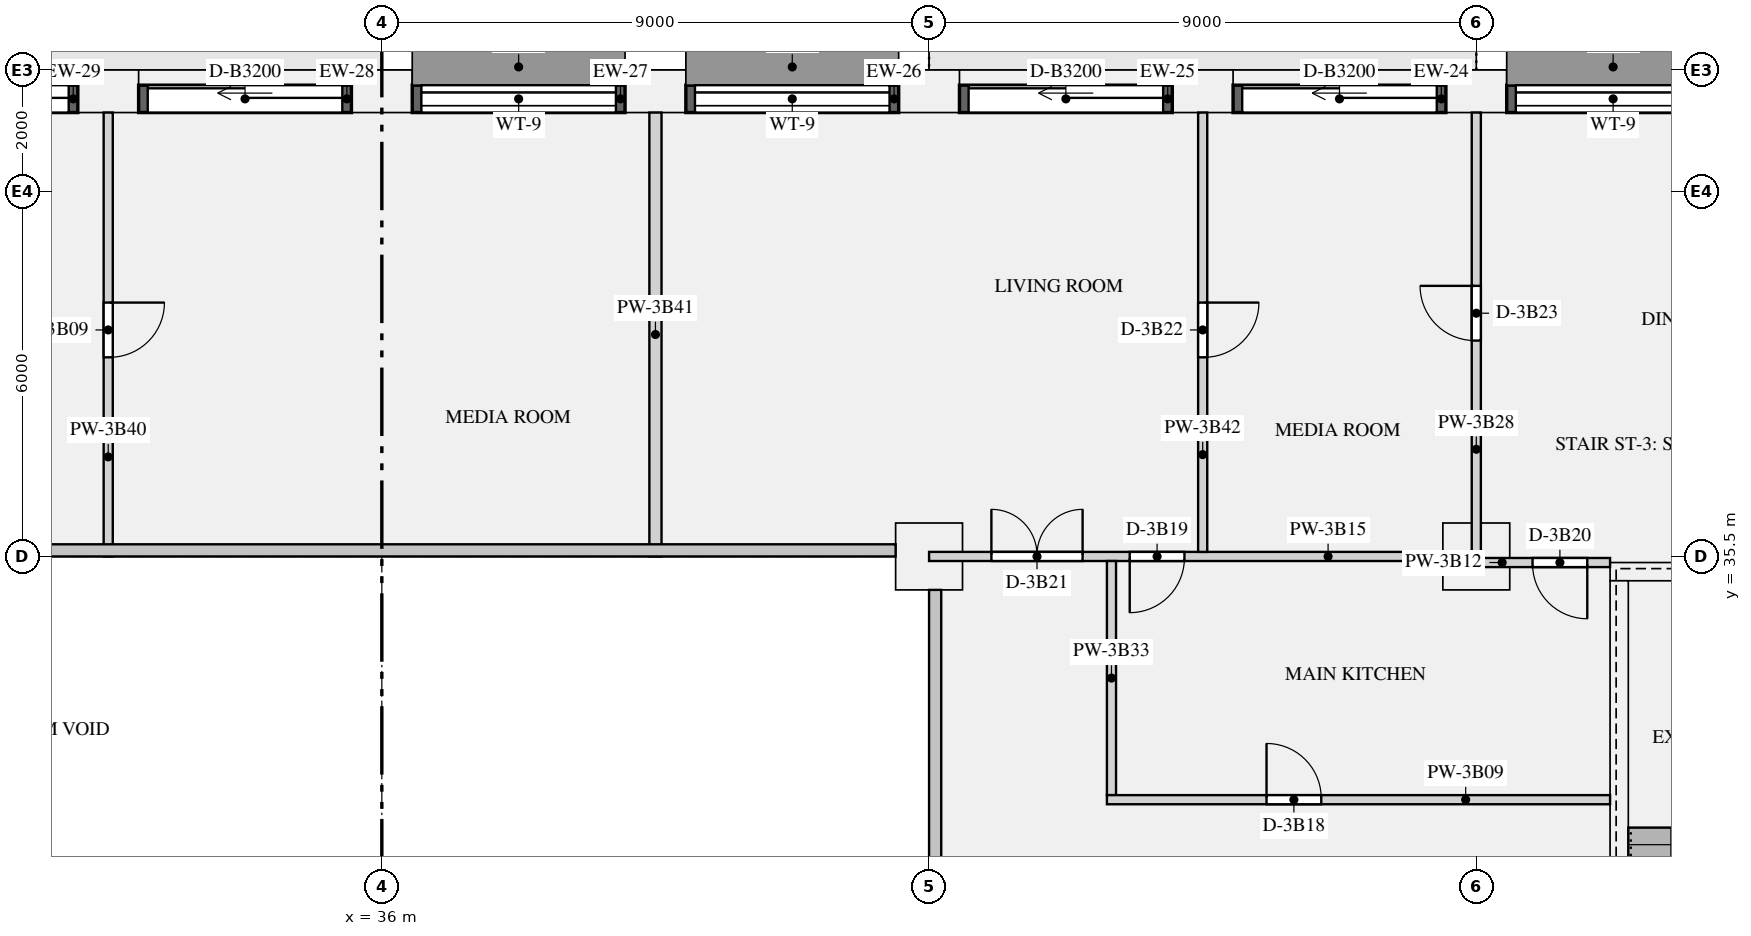
"""IFC4 building model, lengths in metres.
Left out: names, types, materials, properties, quantities, classifications, styles, units other than length and angle.
Written with IfcOpenShell. Run it as: python <this file> out.ifc"""

import sys

from ifc_helpers import new_model, si_unit, direction, frame, frame_2d, origin, origin_2d, place, context, subcontext, project, spatial, rectangle, extrude, element, fill, save


model = new_model("IFC4")
c1 = context("Model", 3, precision=1e-05, world=origin(), true_north=direction((0.0, 1.0)))
c2 = subcontext(c1, "Body", "Model", "MODEL_VIEW")
j1 = project(units=[si_unit("LENGTHUNIT", "METRE"), si_unit("PLANEANGLEUNIT", "RADIAN")], contexts=[c1])
p1 = place(None, origin())
s1 = spatial("IfcSite", under=j1, at=p1, CompositionType="ELEMENT")
p2 = place(p1, origin())
s2 = spatial("IfcBuilding", under=s1, at=p2, CompositionType="ELEMENT")
p3 = place(p2, frame((0.0, 0.0, 150.75)))
s3 = spatial("IfcBuildingStorey", under=s2, at=p3, CompositionType="ELEMENT", Elevation=150.75)
for number, where, z_axis, x_axis in (
    (1, (54.0, 43.15, 0.0), (0.0, 0.0, 1.0), (-1.0, 0.0, 0.0)),
    (2, (49.5, 43.15, 0.0), (0.0, 0.0, 1.0), (-1.0, 0.0, 0.0)),
    (3, (45.0, 43.15, 0.0), (0.0, 0.0, 1.0), (-1.0, 0.0, 0.0)),
    (4, (40.5, 43.15, 0.0), (0.0, 0.0, 1.0), (-1.0, 0.0, 0.0)),
    (5, (36.0, 43.15, 0.0), (0.0, 0.0, 1.0), (-1.0, 0.0, 0.0)),
    (6, (31.5, 43.15, 0.0), (0.0, 0.0, 1.0), (-1.0, 0.0, 0.0)),
):
    element("IfcColumn", number, at=place(p3, frame(where, z_axis=z_axis, x_axis=x_axis)), inside=s3, PredefinedType="USERDEFINED", context=c2, shape_type="SweptSolid", body=[
        extrude(rectangle(XDim=1.0, YDim=0.7, at=origin_2d()), origin(), (0.0, 0.0, 1.0), 3.15),
    ])
for number, where, z_axis, x_axis in (
    (7, (45.0, 35.5, 0.0), (0.0, 0.0, 1.0), (1.0, 0.0, 0.0)),
    (8, (54.0, 35.5, 0.0), (0.0, 0.0, 1.0), (1.0, 0.0, 0.0)),
):
    element("IfcColumn", number, at=place(p3, frame(where, z_axis=z_axis, x_axis=x_axis)), inside=s3, PredefinedType="COLUMN", context=c2, shape_type="SweptSolid", body=[
        extrude(rectangle(XDim=1.1, YDim=1.1, at=origin_2d()), origin(), (0.0, 0.0, 1.0), 3.15),
    ])
p4 = place(p3, frame((56.2, 35.25, 0.0), z_axis=(0.0, 0.0, 1.0), x_axis=(1.0, 0.0, 0.0)))
e9 = element("IfcWall", 9, at=p4, inside=s3, PredefinedType="SHEAR", context=c2, shape_type="SweptSolid", body=[
    extrude(rectangle(XDim=3.6, YDim=0.3, at=frame_2d((1.8, 0.0))), origin(), (0.0, 0.0, 1.0), 3.15),
])
p5 = place(p3, frame((56.35, 27.3, 0.0), z_axis=(0.0, 0.0, 1.0), x_axis=(0.0, 1.0, 0.0)))
e10 = element("IfcWall", 10, at=p5, inside=s3, PredefinedType="SHEAR", context=c2, shape_type="SweptSolid", body=[
    extrude(rectangle(XDim=7.8, YDim=0.3, at=frame_2d((3.9, 0.0))), origin(), (0.0, 0.0, 1.0), 3.15),
])
p6 = place(p3, frame((58.0, 43.025, 0.9), z_axis=(0.0, 0.0, 1.0), x_axis=(-1.0, 0.0, 0.0)))
e11 = element("IfcWall", 11, at=p6, inside=s3, PredefinedType="SOLIDWALL", context=c2, shape_type="SweptSolid", body=[
    extrude(rectangle(XDim=3.5, YDim=0.45, at=frame_2d((1.75, 0.0))), origin(), (0.0, 0.0, 1.0), 1.93),
])
p7 = place(p6, frame((0.15, 0.0, 0.15)))
e12 = element("IfcOpeningElement", 12, at=p7, cuts=e11, PredefinedType="OPENING", context=c2, shape_type="SweptSolid", body=[
    extrude(rectangle(XDim=3.2, YDim=1.5, at=frame_2d((1.6, 0.75))), frame((0.0, 0.235, 0.0), z_axis=(0.0, -1.0, 0.0), x_axis=(1.0, 0.0, 0.0)), (0.0, 0.0, 1.0), 0.47),
])
p8 = place(p3, frame((53.5, 43.025, 0.0), z_axis=(0.0, 0.0, 1.0), x_axis=(-1.0, 0.0, 0.0)))
e13 = element("IfcWall", 13, at=p8, inside=s3, PredefinedType="SOLIDWALL", context=c2, shape_type="SweptSolid", body=[
    extrude(rectangle(XDim=3.5, YDim=0.45, at=frame_2d((1.75, 0.0))), origin(), (0.0, 0.0, 1.0), 2.83),
])
p9 = place(p8, frame((0.15, 0.0, 0.0)))
e14 = element("IfcOpeningElement", 14, at=p9, cuts=e13, PredefinedType="OPENING", context=c2, shape_type="SweptSolid", body=[
    extrude(rectangle(XDim=3.2, YDim=2.3, at=frame_2d((1.6, 1.15))), frame((0.0, 0.235, 0.0), z_axis=(0.0, -1.0, 0.0), x_axis=(1.0, 0.0, 0.0)), (0.0, 0.0, 1.0), 0.47),
])
p10 = place(p3, frame((49.0, 43.025, 0.0), z_axis=(0.0, 0.0, 1.0), x_axis=(-1.0, 0.0, 0.0)))
e15 = element("IfcWall", 15, at=p10, inside=s3, PredefinedType="SOLIDWALL", context=c2, shape_type="SweptSolid", body=[
    extrude(rectangle(XDim=3.5, YDim=0.45, at=frame_2d((1.75, 0.0))), origin(), (0.0, 0.0, 1.0), 2.83),
])
p11 = place(p10, frame((0.15, 0.0, 0.0)))
e16 = element("IfcOpeningElement", 16, at=p11, cuts=e15, PredefinedType="OPENING", context=c2, shape_type="SweptSolid", body=[
    extrude(rectangle(XDim=3.2, YDim=2.3, at=frame_2d((1.6, 1.15))), frame((0.0, 0.235, 0.0), z_axis=(0.0, -1.0, 0.0), x_axis=(1.0, 0.0, 0.0)), (0.0, 0.0, 1.0), 0.47),
])
p12 = place(p3, frame((44.5, 43.025, 0.9), z_axis=(0.0, 0.0, 1.0), x_axis=(-1.0, 0.0, 0.0)))
e17 = element("IfcWall", 17, at=p12, inside=s3, PredefinedType="SOLIDWALL", context=c2, shape_type="SweptSolid", body=[
    extrude(rectangle(XDim=3.5, YDim=0.45, at=frame_2d((1.75, 0.0))), origin(), (0.0, 0.0, 1.0), 1.93),
])
p13 = place(p12, frame((0.15, 0.0, 0.15)))
e18 = element("IfcOpeningElement", 18, at=p13, cuts=e17, PredefinedType="OPENING", context=c2, shape_type="SweptSolid", body=[
    extrude(rectangle(XDim=3.2, YDim=1.5, at=frame_2d((1.6, 0.75))), frame((0.0, 0.235, 0.0), z_axis=(0.0, -1.0, 0.0), x_axis=(1.0, 0.0, 0.0)), (0.0, 0.0, 1.0), 0.47),
])
p14 = place(p3, frame((40.0, 43.025, 0.9), z_axis=(0.0, 0.0, 1.0), x_axis=(-1.0, 0.0, 0.0)))
e19 = element("IfcWall", 19, at=p14, inside=s3, PredefinedType="SOLIDWALL", context=c2, shape_type="SweptSolid", body=[
    extrude(rectangle(XDim=3.5, YDim=0.45, at=frame_2d((1.75, 0.0))), origin(), (0.0, 0.0, 1.0), 1.93),
])
p15 = place(p14, frame((0.15, 0.0, 0.15)))
e20 = element("IfcOpeningElement", 20, at=p15, cuts=e19, PredefinedType="OPENING", context=c2, shape_type="SweptSolid", body=[
    extrude(rectangle(XDim=3.2, YDim=1.5, at=frame_2d((1.6, 0.75))), frame((0.0, 0.235, 0.0), z_axis=(0.0, -1.0, 0.0), x_axis=(1.0, 0.0, 0.0)), (0.0, 0.0, 1.0), 0.47),
])
p16 = place(p3, frame((35.5, 43.025, 0.0), z_axis=(0.0, 0.0, 1.0), x_axis=(-1.0, 0.0, 0.0)))
e21 = element("IfcWall", 21, at=p16, inside=s3, PredefinedType="SOLIDWALL", context=c2, shape_type="SweptSolid", body=[
    extrude(rectangle(XDim=3.5, YDim=0.45, at=frame_2d((1.75, 0.0))), origin(), (0.0, 0.0, 1.0), 2.83),
])
p17 = place(p16, frame((0.15, 0.0, 0.0)))
e22 = element("IfcOpeningElement", 22, at=p17, cuts=e21, PredefinedType="OPENING", context=c2, shape_type="SweptSolid", body=[
    extrude(rectangle(XDim=3.2, YDim=2.3, at=frame_2d((1.6, 1.15))), frame((0.0, 0.235, 0.0), z_axis=(0.0, -1.0, 0.0), x_axis=(1.0, 0.0, 0.0)), (0.0, 0.0, 1.0), 0.47),
])
p18 = place(p3, frame((31.0, 43.025, 0.0), z_axis=(0.0, 0.0, 1.0), x_axis=(-1.0, 0.0, 0.0)))
e23 = element("IfcWall", 23, at=p18, inside=s3, PredefinedType="SOLIDWALL", context=c2, shape_type="SweptSolid", body=[
    extrude(rectangle(XDim=3.5, YDim=0.45, at=frame_2d((1.75, 0.0))), origin(), (0.0, 0.0, 1.0), 2.83),
])
p19 = place(p18, frame((0.15, 0.0, 0.0)))
e24 = element("IfcOpeningElement", 24, at=p19, cuts=e23, PredefinedType="OPENING", context=c2, shape_type="SweptSolid", body=[
    extrude(rectangle(XDim=3.2, YDim=2.3, at=frame_2d((1.6, 1.15))), frame((0.0, 0.235, 0.0), z_axis=(0.0, -1.0, 0.0), x_axis=(1.0, 0.0, 0.0)), (0.0, 0.0, 1.0), 0.47),
])
p20 = place(p3, frame((47.925, 31.5, 0.0), z_axis=(0.0, 0.0, 1.0), x_axis=(1.0, 0.0, 0.0)))
e25 = element("IfcWall", 25, at=p20, inside=s3, PredefinedType="PARTITIONING", context=c2, shape_type="SweptSolid", body=[
    extrude(rectangle(XDim=8.275, YDim=0.15, at=frame_2d((4.137, 0.0))), origin(), (0.0, 0.0, 1.0), 2.83),
])
p21 = place(p20, frame((2.625, 0.0, 0.0)))
e26 = element("IfcOpeningElement", 26, at=p21, cuts=e25, PredefinedType="OPENING", context=c2, shape_type="SweptSolid", body=[
    extrude(rectangle(XDim=0.9, YDim=2.1, at=frame_2d((0.45, 1.05))), frame((0.0, 0.085, 0.0), z_axis=(0.0, -1.0, 0.0), x_axis=(1.0, 0.0, 0.0)), (0.0, 0.0, 1.0), 0.17),
])
p22 = place(p3, frame((53.925, 35.4, 0.0), z_axis=(0.0, 0.0, 1.0), x_axis=(1.0, 0.0, 0.0)))
e27 = element("IfcWall", 27, at=p22, inside=s3, PredefinedType="PARTITIONING", context=c2, shape_type="SweptSolid", body=[
    extrude(rectangle(XDim=2.275, YDim=0.15, at=frame_2d((1.137, 0.0))), origin(), (0.0, 0.0, 1.0), 2.83),
])
p23 = place(p22, frame((1.0, 0.0, 0.0)))
e28 = element("IfcOpeningElement", 28, at=p23, cuts=e27, PredefinedType="OPENING", context=c2, shape_type="SweptSolid", body=[
    extrude(rectangle(XDim=0.9, YDim=2.1, at=frame_2d((0.45, 1.05))), frame((0.0, 0.085, 0.0), z_axis=(0.0, -1.0, 0.0), x_axis=(1.0, 0.0, 0.0)), (0.0, 0.0, 1.0), 0.17),
])
p24 = place(p3, frame((45.0, 35.5, 0.0), z_axis=(0.0, 0.0, 1.0), x_axis=(1.0, 0.0, 0.0)))
e29 = element("IfcWall", 29, at=p24, inside=s3, PredefinedType="PARTITIONING", context=c2, shape_type="SweptSolid", body=[
    extrude(rectangle(XDim=8.925, YDim=0.15, at=frame_2d((4.462, 0.0))), origin(), (0.0, 0.0, 1.0), 2.83),
])
p25 = place(p24, frame((3.3, 0.0, 0.0)))
e30 = element("IfcOpeningElement", 30, at=p25, cuts=e29, PredefinedType="OPENING", context=c2, shape_type="SweptSolid", body=[
    extrude(rectangle(XDim=0.9, YDim=2.1, at=frame_2d((0.45, 1.05))), frame((0.0, 0.085, 0.0), z_axis=(0.0, -1.0, 0.0), x_axis=(1.0, 0.0, 0.0)), (0.0, 0.0, 1.0), 0.17),
])
p26 = place(p24, frame((1.025, 0.0, 0.0)))
e31 = element("IfcOpeningElement", 31, at=p26, cuts=e29, PredefinedType="OPENING", context=c2, shape_type="SweptSolid", body=[
    extrude(rectangle(XDim=1.5, YDim=2.1, at=frame_2d((0.75, 1.05))), frame((0.0, 0.085, 0.0), z_axis=(0.0, -1.0, 0.0), x_axis=(1.0, 0.0, 0.0)), (0.0, 0.0, 1.0), 0.17),
])
p27 = place(p3, frame((54.0, 35.475, 0.0), z_axis=(0.0, 0.0, 1.0), x_axis=(0.0, 1.0, 0.0)))
e32 = element("IfcWall", 32, at=p27, inside=s3, PredefinedType="PARTITIONING", context=c2, shape_type="SweptSolid", body=[
    extrude(rectangle(XDim=7.325, YDim=0.15, at=frame_2d((3.663, 0.0))), origin(), (0.0, 0.0, 1.0), 2.83),
])
p28 = place(p27, frame((3.575, 0.0, 0.0)))
e33 = element("IfcOpeningElement", 33, at=p28, cuts=e32, PredefinedType="OPENING", context=c2, shape_type="SweptSolid", body=[
    extrude(rectangle(XDim=0.9, YDim=2.1, at=frame_2d((0.45, 1.05))), frame((0.0, 0.085, 0.0), z_axis=(0.0, -1.0, 0.0), x_axis=(1.0, 0.0, 0.0)), (0.0, 0.0, 1.0), 0.17),
])
p29 = place(p3, frame((48.0, 31.575, 0.0), z_axis=(0.0, 0.0, 1.0), x_axis=(0.0, 1.0, 0.0)))
e34 = element("IfcWall", 34, at=p29, inside=s3, PredefinedType="PARTITIONING", context=c2, shape_type="SweptSolid", body=[
    extrude(rectangle(XDim=3.85, YDim=0.15, at=frame_2d((1.925, 0.0))), origin(), (0.0, 0.0, 1.0), 2.83),
])
p30 = place(p3, frame((31.5, 35.5, 0.0), z_axis=(0.0, 0.0, 1.0), x_axis=(0.0, 1.0, 0.0)))
e35 = element("IfcWall", 35, at=p30, inside=s3, PredefinedType="PARTITIONING", context=c2, shape_type="SweptSolid", body=[
    extrude(rectangle(XDim=7.3, YDim=0.15, at=frame_2d((3.65, 0.0))), origin(), (0.0, 0.0, 1.0), 2.83),
])
p31 = place(p30, frame((3.275, 0.0, 0.0)))
e36 = element("IfcOpeningElement", 36, at=p31, cuts=e35, PredefinedType="OPENING", context=c2, shape_type="SweptSolid", body=[
    extrude(rectangle(XDim=0.9, YDim=2.1, at=frame_2d((0.45, 1.05))), frame((0.0, 0.085, 0.0), z_axis=(0.0, -1.0, 0.0), x_axis=(1.0, 0.0, 0.0)), (0.0, 0.0, 1.0), 0.17),
])
p32 = place(p3, frame((40.5, 35.5, 0.0), z_axis=(0.0, 0.0, 1.0), x_axis=(0.0, 1.0, 0.0)))
e37 = element("IfcWall", 37, at=p32, inside=s3, PredefinedType="PARTITIONING", context=c2, shape_type="SweptSolid", body=[
    extrude(rectangle(XDim=7.3, YDim=0.2, at=frame_2d((3.65, 0.0))), origin(), (0.0, 0.0, 1.0), 2.83),
])
p33 = place(p3, frame((49.5, 35.575, 0.0), z_axis=(0.0, 0.0, 1.0), x_axis=(0.0, 1.0, 0.0)))
e38 = element("IfcWall", 38, at=p33, inside=s3, PredefinedType="PARTITIONING", context=c2, shape_type="SweptSolid", body=[
    extrude(rectangle(XDim=7.225, YDim=0.15, at=frame_2d((3.613, 0.0))), origin(), (0.0, 0.0, 1.0), 2.83),
])
p34 = place(p33, frame((3.2, 0.0, 0.0)))
e39 = element("IfcOpeningElement", 39, at=p34, cuts=e38, PredefinedType="OPENING", context=c2, shape_type="SweptSolid", body=[
    extrude(rectangle(XDim=0.9, YDim=2.1, at=frame_2d((0.45, 1.05))), frame((0.0, 0.085, 0.0), z_axis=(0.0, -1.0, 0.0), x_axis=(1.0, 0.0, 0.0)), (0.0, 0.0, 1.0), 0.17),
])
p35 = place(p7, origin())
e40 = element("IfcWindow", 40, at=p35, inside=s3, PartitioningType="SINGLE_PANEL", PredefinedType="WINDOW", context=c2, shape_type="SweptSolid", body=[
    extrude(rectangle(XDim=3.2, YDim=1.5, at=frame_2d((1.6, 0.75))), frame((0.0, -0.065, 0.0), z_axis=(0.0, -1.0, 0.0), x_axis=(1.0, 0.0, 0.0)), (0.0, 0.0, 1.0), 0.06),
])
fill(e12, e40)
p36 = place(p9, origin())
e41 = element("IfcDoor", 41, at=p36, inside=s3, OperationType="SLIDING_TO_LEFT", PredefinedType="DOOR", context=c2, shape_type="SweptSolid", body=[
    extrude(rectangle(XDim=3.2, YDim=2.3, at=frame_2d((1.6, 1.15))), frame((0.0, -0.07, 0.0), z_axis=(0.0, -1.0, 0.0), x_axis=(1.0, 0.0, 0.0)), (0.0, 0.0, 1.0), 0.05),
])
fill(e14, e41)
p37 = place(p11, origin())
e42 = element("IfcDoor", 42, at=p37, inside=s3, OperationType="SLIDING_TO_LEFT", PredefinedType="DOOR", context=c2, shape_type="SweptSolid", body=[
    extrude(rectangle(XDim=3.2, YDim=2.3, at=frame_2d((1.6, 1.15))), frame((0.0, -0.07, 0.0), z_axis=(0.0, -1.0, 0.0), x_axis=(1.0, 0.0, 0.0)), (0.0, 0.0, 1.0), 0.05),
])
fill(e16, e42)
p38 = place(p13, origin())
e43 = element("IfcWindow", 43, at=p38, inside=s3, PartitioningType="SINGLE_PANEL", PredefinedType="WINDOW", context=c2, shape_type="SweptSolid", body=[
    extrude(rectangle(XDim=3.2, YDim=1.5, at=frame_2d((1.6, 0.75))), frame((0.0, -0.065, 0.0), z_axis=(0.0, -1.0, 0.0), x_axis=(1.0, 0.0, 0.0)), (0.0, 0.0, 1.0), 0.06),
])
fill(e18, e43)
p39 = place(p15, origin())
e44 = element("IfcWindow", 44, at=p39, inside=s3, PartitioningType="SINGLE_PANEL", PredefinedType="WINDOW", context=c2, shape_type="SweptSolid", body=[
    extrude(rectangle(XDim=3.2, YDim=1.5, at=frame_2d((1.6, 0.75))), frame((0.0, -0.065, 0.0), z_axis=(0.0, -1.0, 0.0), x_axis=(1.0, 0.0, 0.0)), (0.0, 0.0, 1.0), 0.06),
])
fill(e20, e44)
p40 = place(p17, origin())
e45 = element("IfcDoor", 45, at=p40, inside=s3, OperationType="SLIDING_TO_LEFT", PredefinedType="DOOR", context=c2, shape_type="SweptSolid", body=[
    extrude(rectangle(XDim=3.2, YDim=2.3, at=frame_2d((1.6, 1.15))), frame((0.0, -0.07, 0.0), z_axis=(0.0, -1.0, 0.0), x_axis=(1.0, 0.0, 0.0)), (0.0, 0.0, 1.0), 0.05),
])
fill(e22, e45)
p41 = place(p19, origin())
e46 = element("IfcDoor", 46, at=p41, inside=s3, OperationType="SLIDING_TO_LEFT", PredefinedType="DOOR", context=c2, shape_type="SweptSolid", body=[
    extrude(rectangle(XDim=3.2, YDim=2.3, at=frame_2d((1.6, 1.15))), frame((0.0, -0.07, 0.0), z_axis=(0.0, -1.0, 0.0), x_axis=(1.0, 0.0, 0.0)), (0.0, 0.0, 1.0), 0.05),
])
fill(e24, e46)
p42 = place(p31, frame((0.9, 0.0, 0.0), z_axis=(0.0, 0.0, 1.0), x_axis=(-1.0, 0.0, 0.0)))
e47 = element("IfcDoor", 47, at=p42, inside=s3, OperationType="SINGLE_SWING_LEFT", PredefinedType="DOOR", context=c2, shape_type="SweptSolid", body=[
    extrude(rectangle(XDim=0.9, YDim=2.1, at=frame_2d((0.45, 1.05))), frame((0.0, 0.025, 0.0), z_axis=(0.0, -1.0, 0.0), x_axis=(1.0, 0.0, 0.0)), (0.0, 0.0, 1.0), 0.05),
])
fill(e36, e47)
p43 = place(p21, origin())
e48 = element("IfcDoor", 48, at=p43, inside=s3, OperationType="SINGLE_SWING_LEFT", PredefinedType="DOOR", context=c2, shape_type="SweptSolid", body=[
    extrude(rectangle(XDim=0.9, YDim=2.1, at=frame_2d((0.45, 1.05))), frame((0.0, 0.025, 0.0), z_axis=(0.0, -1.0, 0.0), x_axis=(1.0, 0.0, 0.0)), (0.0, 0.0, 1.0), 0.05),
])
fill(e26, e48)
p44 = place(p25, frame((0.9, 0.0, 0.0), z_axis=(0.0, 0.0, 1.0), x_axis=(-1.0, 0.0, 0.0)))
e49 = element("IfcDoor", 49, at=p44, inside=s3, OperationType="SINGLE_SWING_RIGHT", PredefinedType="DOOR", context=c2, shape_type="SweptSolid", body=[
    extrude(rectangle(XDim=0.9, YDim=2.1, at=frame_2d((0.45, 1.05))), frame((0.0, 0.025, 0.0), z_axis=(0.0, -1.0, 0.0), x_axis=(1.0, 0.0, 0.0)), (0.0, 0.0, 1.0), 0.05),
])
fill(e30, e49)
p45 = place(p23, frame((0.9, 0.0, 0.0), z_axis=(0.0, 0.0, 1.0), x_axis=(-1.0, 0.0, 0.0)))
e50 = element("IfcDoor", 50, at=p45, inside=s3, OperationType="SINGLE_SWING_LEFT", PredefinedType="DOOR", context=c2, shape_type="SweptSolid", body=[
    extrude(rectangle(XDim=0.9, YDim=2.1, at=frame_2d((0.45, 1.05))), frame((0.0, 0.025, 0.0), z_axis=(0.0, -1.0, 0.0), x_axis=(1.0, 0.0, 0.0)), (0.0, 0.0, 1.0), 0.05),
])
fill(e28, e50)
p46 = place(p26, origin())
e51 = element("IfcDoor", 51, at=p46, inside=s3, OperationType="DOUBLE_DOOR_SINGLE_SWING", PredefinedType="DOOR", context=c2, shape_type="SweptSolid", body=[
    extrude(rectangle(XDim=1.5, YDim=2.1, at=frame_2d((0.75, 1.05))), frame((0.0, 0.025, 0.0), z_axis=(0.0, -1.0, 0.0), x_axis=(1.0, 0.0, 0.0)), (0.0, 0.0, 1.0), 0.05),
])
fill(e31, e51)
p47 = place(p34, frame((0.9, 0.0, 0.0), z_axis=(0.0, 0.0, 1.0), x_axis=(-1.0, 0.0, 0.0)))
e52 = element("IfcDoor", 52, at=p47, inside=s3, OperationType="SINGLE_SWING_LEFT", PredefinedType="DOOR", context=c2, shape_type="SweptSolid", body=[
    extrude(rectangle(XDim=0.9, YDim=2.1, at=frame_2d((0.45, 1.05))), frame((0.0, 0.025, 0.0), z_axis=(0.0, -1.0, 0.0), x_axis=(1.0, 0.0, 0.0)), (0.0, 0.0, 1.0), 0.05),
])
fill(e39, e52)
p48 = place(p28, origin())
e53 = element("IfcDoor", 53, at=p48, inside=s3, OperationType="SINGLE_SWING_RIGHT", PredefinedType="DOOR", context=c2, shape_type="SweptSolid", body=[
    extrude(rectangle(XDim=0.9, YDim=2.1, at=frame_2d((0.45, 1.05))), frame((0.0, 0.025, 0.0), z_axis=(0.0, -1.0, 0.0), x_axis=(1.0, 0.0, 0.0)), (0.0, 0.0, 1.0), 0.05),
])
fill(e33, e53)
save(model, sys.argv[1])
